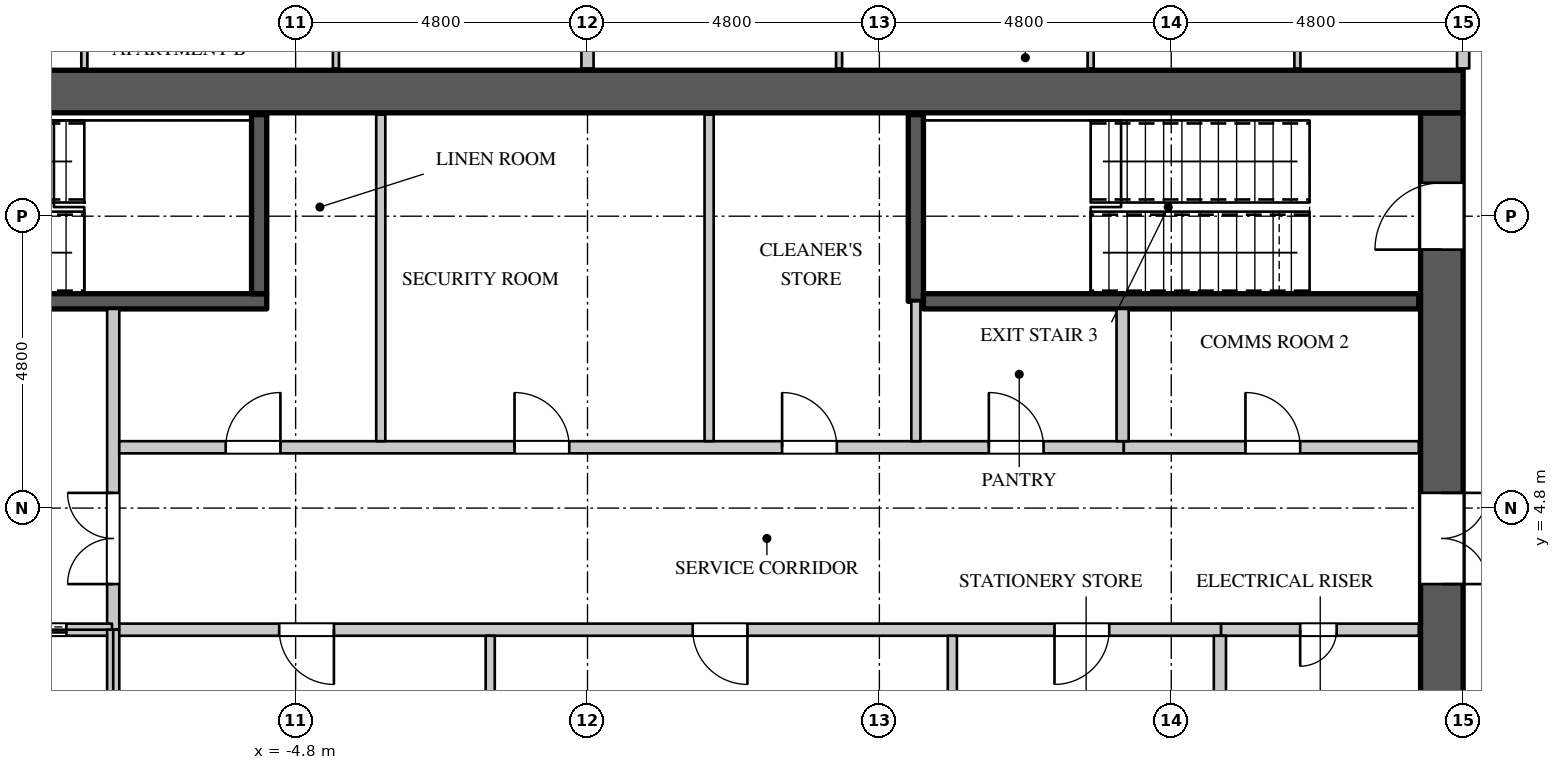
"""IFC4 building model, lengths in metres.
Left out: names, types, materials, properties, quantities, classifications, styles, units other than length and angle.
Written with IfcOpenShell. Run it as: python <this file> out.ifc"""

import sys

from ifc_helpers import new_model, si_unit, direction, frame, frame_2d, origin, place, context, subcontext, project, spatial, rectangle, extrude, element, fill, save


model = new_model("IFC4")
c1 = context("Model", 3, precision=1e-05, world=origin(), true_north=direction((0.0, 1.0)))
c2 = subcontext(c1, "Body", "Model", "MODEL_VIEW")
j1 = project(units=[si_unit("LENGTHUNIT", "METRE"), si_unit("PLANEANGLEUNIT", "RADIAN")], contexts=[c1])
p1 = place(None, origin())
s1 = spatial("IfcSite", under=j1, at=p1, CompositionType="ELEMENT")
p2 = place(p1, origin())
s2 = spatial("IfcBuilding", under=s1, at=p2, CompositionType="ELEMENT")
p3 = place(p2, frame((0.0, 0.0, 166.5)))
s3 = spatial("IfcBuildingStorey", under=s2, at=p3, CompositionType="ELEMENT", Elevation=166.5)
p4 = place(p3, frame((-14.4, 11.65, 0.0), z_axis=(0.0, 0.0, 1.0), x_axis=(1.0, 0.0, 0.0)))
e1 = element("IfcWall", 1, at=p4, inside=s3, PredefinedType="SHEAR", context=c2, shape_type="SweptSolid", body=[
    extrude(rectangle(XDim=28.8, YDim=0.7, at=frame_2d((14.4, 0.0))), origin(), (0.0, 0.0, 1.0), 4.2),
])
p5 = place(p3, frame((14.05, -11.3, 0.0), z_axis=(0.0, 0.0, 1.0), x_axis=(0.0, 1.0, 0.0)))
e2 = element("IfcWall", 2, at=p5, inside=s3, PredefinedType="SHEAR", context=c2, shape_type="SweptSolid", body=[
    extrude(rectangle(XDim=22.6, YDim=0.7, at=frame_2d((11.3, 0.0))), origin(), (0.0, 0.0, 1.0), 4.2),
])
p6 = place(p5, frame((20.35, 0.0, 0.0)))
e3 = element("IfcOpeningElement", 3, at=p6, cuts=e2, PredefinedType="OPENING", context=c2, shape_type="SweptSolid", body=[
    extrude(rectangle(XDim=1.1, YDim=2.2, at=frame_2d((0.55, 1.1))), frame((0.0, 0.36, 0.0), z_axis=(0.0, -1.0, 0.0), x_axis=(1.0, 0.0, 0.0)), (0.0, 0.0, 1.0), 0.72),
])
p7 = place(p5, frame((1.15, 0.0, 0.0)))
e4 = element("IfcOpeningElement", 4, at=p7, cuts=e2, PredefinedType="OPENING", context=c2, shape_type="SweptSolid", body=[
    extrude(rectangle(XDim=1.1, YDim=2.2, at=frame_2d((0.55, 1.1))), frame((0.0, 0.36, 0.0), z_axis=(0.0, -1.0, 0.0), x_axis=(1.0, 0.0, 0.0)), (0.0, 0.0, 1.0), 0.72),
])
p8 = place(p5, frame((14.85, 0.0, 0.0)))
e5 = element("IfcOpeningElement", 5, at=p8, cuts=e2, PredefinedType="OPENING", context=c2, shape_type="SweptSolid", body=[
    extrude(rectangle(XDim=1.5, YDim=2.4, at=frame_2d((0.75, 1.2))), frame((0.0, 0.36, 0.0), z_axis=(0.0, -1.0, 0.0), x_axis=(1.0, 0.0, 0.0)), (0.0, 0.0, 1.0), 0.72),
])
p9 = place(p5, frame((6.25, 0.0, 0.0)))
e6 = element("IfcOpeningElement", 6, at=p9, cuts=e2, PredefinedType="OPENING", context=c2, shape_type="SweptSolid", body=[
    extrude(rectangle(XDim=1.5, YDim=2.4, at=frame_2d((0.75, 1.2))), frame((0.0, 0.36, 0.0), z_axis=(0.0, -1.0, 0.0), x_axis=(1.0, 0.0, 0.0)), (0.0, 0.0, 1.0), 0.72),
])
p10 = place(p3, frame((-7.82, 2.8, 0.0), z_axis=(0.0, 0.0, 1.0), x_axis=(1.0, 0.0, 0.0)))
e7 = element("IfcWall", 7, at=p10, inside=s3, PredefinedType="PARTITIONING", context=c2, shape_type="SweptSolid", body=[
    extrude(rectangle(XDim=18.24, YDim=0.2, at=frame_2d((9.12, 0.0))), origin(), (0.0, 0.0, 1.0), 3.95),
])
p11 = place(p10, frame((2.75, 0.0, 0.0)))
e8 = element("IfcOpeningElement", 8, at=p11, cuts=e7, PredefinedType="OPENING", context=c2, shape_type="SweptSolid", body=[
    extrude(rectangle(XDim=0.9, YDim=2.2, at=frame_2d((0.45, 1.1))), frame((0.0, 0.11, 0.0), z_axis=(0.0, -1.0, 0.0), x_axis=(1.0, 0.0, 0.0)), (0.0, 0.0, 1.0), 0.22),
])
p12 = place(p10, frame((9.55, 0.0, 0.0)))
e9 = element("IfcOpeningElement", 9, at=p12, cuts=e7, PredefinedType="OPENING", context=c2, shape_type="SweptSolid", body=[
    extrude(rectangle(XDim=0.9, YDim=2.2, at=frame_2d((0.45, 1.1))), frame((0.0, 0.11, 0.0), z_axis=(0.0, -1.0, 0.0), x_axis=(1.0, 0.0, 0.0)), (0.0, 0.0, 1.0), 0.22),
])
p13 = place(p10, frame((15.5, 0.0, 0.0)))
e10 = element("IfcOpeningElement", 10, at=p13, cuts=e7, PredefinedType="OPENING", context=c2, shape_type="SweptSolid", body=[
    extrude(rectangle(XDim=0.9, YDim=2.2, at=frame_2d((0.45, 1.1))), frame((0.0, 0.11, 0.0), z_axis=(0.0, -1.0, 0.0), x_axis=(1.0, 0.0, 0.0)), (0.0, 0.0, 1.0), 0.22),
])
p14 = place(p3, frame((-7.8, 2.8, 0.0), z_axis=(0.0, 0.0, 1.0), x_axis=(0.0, 1.0, 0.0)))
e11 = element("IfcWall", 11, at=p14, inside=s3, PredefinedType="PARTITIONING", context=c2, shape_type="SweptSolid", body=[
    extrude(rectangle(XDim=5.275, YDim=0.2, at=frame_2d((2.637, 0.0))), origin(), (0.0, 0.0, 1.0), 3.95),
])
p15 = place(p14, frame((0.75, 0.0, 0.0)))
e12 = element("IfcOpeningElement", 12, at=p15, cuts=e11, PredefinedType="OPENING", context=c2, shape_type="SweptSolid", body=[
    extrude(rectangle(XDim=1.5, YDim=2.4, at=frame_2d((0.75, 1.2))), frame((0.0, 0.11, 0.0), z_axis=(0.0, -1.0, 0.0), x_axis=(1.0, 0.0, 0.0)), (0.0, 0.0, 1.0), 0.22),
])
p16 = place(p3, frame((-7.7, 5.8, 0.0), z_axis=(0.0, 0.0, 1.0), x_axis=(1.0, 0.0, 0.0)))
e13 = element("IfcWall", 13, at=p16, inside=s3, PredefinedType="PARTITIONING", context=c2, shape_type="SweptSolid", body=[
    extrude(rectangle(XDim=16.52, YDim=0.2, at=frame_2d((8.26, 0.0))), origin(), (0.0, 0.0, 1.0), 3.95),
])
p17 = place(p16, frame((1.75, 0.0, 0.0)))
e14 = element("IfcOpeningElement", 14, at=p17, cuts=e13, PredefinedType="OPENING", context=c2, shape_type="SweptSolid", body=[
    extrude(rectangle(XDim=0.9, YDim=2.2, at=frame_2d((0.45, 1.1))), frame((0.0, 0.11, 0.0), z_axis=(0.0, -1.0, 0.0), x_axis=(1.0, 0.0, 0.0)), (0.0, 0.0, 1.0), 0.22),
])
p18 = place(p16, frame((6.5, 0.0, 0.0)))
e15 = element("IfcOpeningElement", 15, at=p18, cuts=e13, PredefinedType="OPENING", context=c2, shape_type="SweptSolid", body=[
    extrude(rectangle(XDim=0.9, YDim=2.2, at=frame_2d((0.45, 1.1))), frame((0.0, 0.11, 0.0), z_axis=(0.0, -1.0, 0.0), x_axis=(1.0, 0.0, 0.0)), (0.0, 0.0, 1.0), 0.22),
])
p19 = place(p16, frame((10.9, 0.0, 0.0)))
e16 = element("IfcOpeningElement", 16, at=p19, cuts=e13, PredefinedType="OPENING", context=c2, shape_type="SweptSolid", body=[
    extrude(rectangle(XDim=0.9, YDim=2.2, at=frame_2d((0.45, 1.1))), frame((0.0, 0.11, 0.0), z_axis=(0.0, -1.0, 0.0), x_axis=(1.0, 0.0, 0.0)), (0.0, 0.0, 1.0), 0.22),
])
p20 = place(p16, frame((14.3, 0.0, 0.0)))
e17 = element("IfcOpeningElement", 17, at=p20, cuts=e13, PredefinedType="OPENING", context=c2, shape_type="SweptSolid", body=[
    extrude(rectangle(XDim=0.9, YDim=2.2, at=frame_2d((0.45, 1.1))), frame((0.0, 0.11, 0.0), z_axis=(0.0, -1.0, 0.0), x_axis=(1.0, 0.0, 0.0)), (0.0, 0.0, 1.0), 0.22),
])
p21 = place(p3, frame((14.4, 12.03, 0.0), z_axis=(0.0, 0.0, 1.0), x_axis=(0.0, 1.0, 0.0)))
e18 = element("IfcWall", 18, at=p21, inside=s3, PredefinedType="PARTITIONING", context=c2, shape_type="SweptSolid", body=[
    extrude(rectangle(XDim=2.27, YDim=0.2, at=frame_2d((1.135, 0.0))), origin(), (0.0, 0.0, 1.0), 3.95),
])
p22 = place(p3, frame((-3.4, 5.9, 0.0), z_axis=(0.0, 0.0, 1.0), x_axis=(0.0, 1.0, 0.0)))
e19 = element("IfcWall", 19, at=p22, inside=s3, PredefinedType="PARTITIONING", context=c2, shape_type="SweptSolid", body=[
    extrude(rectangle(XDim=5.37, YDim=0.15, at=frame_2d((2.685, 0.0))), origin(), (0.0, 0.0, 1.0), 3.95),
])
p23 = place(p3, frame((-1.6, 0.1, 0.0), z_axis=(0.0, 0.0, 1.0), x_axis=(0.0, 1.0, 0.0)))
e20 = element("IfcWall", 20, at=p23, inside=s3, PredefinedType="PARTITIONING", context=c2, shape_type="SweptSolid", body=[
    extrude(rectangle(XDim=2.6, YDim=0.15, at=frame_2d((1.3, 0.0))), origin(), (0.0, 0.0, 1.0), 3.95),
])
p24 = place(p3, frame((2.0, 5.9, 0.0), z_axis=(0.0, 0.0, 1.0), x_axis=(0.0, 1.0, 0.0)))
e21 = element("IfcWall", 21, at=p24, inside=s3, PredefinedType="PARTITIONING", context=c2, shape_type="SweptSolid", body=[
    extrude(rectangle(XDim=5.37, YDim=0.15, at=frame_2d((2.685, 0.0))), origin(), (0.0, 0.0, 1.0), 3.95),
])
p25 = place(p3, frame((5.4, 5.9, 0.0), z_axis=(0.0, 0.0, 1.0), x_axis=(0.0, 1.0, 0.0)))
e22 = element("IfcWall", 22, at=p25, inside=s3, PredefinedType="PARTITIONING", context=c2, shape_type="SweptSolid", body=[
    extrude(rectangle(XDim=2.3, YDim=0.15, at=frame_2d((1.15, 0.0))), origin(), (0.0, 0.0, 1.0), 3.95),
])
p26 = place(p3, frame((6.0, 0.1, 0.0), z_axis=(0.0, 0.0, 1.0), x_axis=(0.0, 1.0, 0.0)))
e23 = element("IfcWall", 23, at=p26, inside=s3, PredefinedType="PARTITIONING", context=c2, shape_type="SweptSolid", body=[
    extrude(rectangle(XDim=2.6, YDim=0.15, at=frame_2d((1.3, 0.0))), origin(), (0.0, 0.0, 1.0), 3.95),
])
p27 = place(p3, frame((0.0, 12.03, 0.0), z_axis=(0.0, 0.0, 1.0), x_axis=(0.0, 1.0, 0.0)))
e24 = element("IfcWall", 24, at=p27, inside=s3, PredefinedType="PARTITIONING", context=c2, shape_type="SweptSolid", body=[
    extrude(rectangle(XDim=12.025, YDim=0.2, at=frame_2d((6.012, 0.0))), origin(), (0.0, 0.0, 1.0), 3.95),
])
p28 = place(p3, frame((8.82, 5.8, 0.0), z_axis=(0.0, 0.0, 1.0), x_axis=(1.0, 0.0, 0.0)))
e25 = element("IfcWall", 25, at=p28, inside=s3, PredefinedType="PARTITIONING", context=c2, shape_type="SweptSolid", body=[
    extrude(rectangle(XDim=4.85, YDim=0.2, at=frame_2d((2.425, 0.0))), origin(), (0.0, 0.0, 1.0), 3.95),
])
p29 = place(p28, frame((2.0, 0.0, 0.0)))
e26 = element("IfcOpeningElement", 26, at=p29, cuts=e25, PredefinedType="OPENING", context=c2, shape_type="SweptSolid", body=[
    extrude(rectangle(XDim=0.9, YDim=2.2, at=frame_2d((0.45, 1.1))), frame((0.0, 0.11, 0.0), z_axis=(0.0, -1.0, 0.0), x_axis=(1.0, 0.0, 0.0)), (0.0, 0.0, 1.0), 0.22),
])
p30 = place(p3, frame((8.8, 5.9, 0.0), z_axis=(0.0, 0.0, 1.0), x_axis=(0.0, 1.0, 0.0)))
e27 = element("IfcWall", 27, at=p30, inside=s3, PredefinedType="PARTITIONING", context=c2, shape_type="SweptSolid", body=[
    extrude(rectangle(XDim=2.175, YDim=0.2, at=frame_2d((1.087, 0.0))), origin(), (0.0, 0.0, 1.0), 3.95),
])
p31 = place(p3, frame((10.42, 2.8, 0.0), z_axis=(0.0, 0.0, 1.0), x_axis=(1.0, 0.0, 0.0)))
e28 = element("IfcWall", 28, at=p31, inside=s3, PredefinedType="PARTITIONING", context=c2, shape_type="SweptSolid", body=[
    extrude(rectangle(XDim=3.25, YDim=0.2, at=frame_2d((1.625, 0.0))), origin(), (0.0, 0.0, 1.0), 3.95),
])
p32 = place(p31, frame((1.3, 0.0, 0.0)))
e29 = element("IfcOpeningElement", 29, at=p32, cuts=e28, PredefinedType="OPENING", context=c2, shape_type="SweptSolid", body=[
    extrude(rectangle(XDim=0.6, YDim=2.0, at=frame_2d((0.3, 1.0))), frame((0.0, 0.11, 0.0), z_axis=(0.0, -1.0, 0.0), x_axis=(1.0, 0.0, 0.0)), (0.0, 0.0, 1.0), 0.22),
])
p33 = place(p3, frame((10.4, 0.1, 0.0), z_axis=(0.0, 0.0, 1.0), x_axis=(0.0, 1.0, 0.0)))
e30 = element("IfcWall", 30, at=p33, inside=s3, PredefinedType="PARTITIONING", context=c2, shape_type="SweptSolid", body=[
    extrude(rectangle(XDim=2.6, YDim=0.2, at=frame_2d((1.3, 0.0))), origin(), (0.0, 0.0, 1.0), 3.95),
])
p34 = place(p3, frame((-13.67, 2.8, 0.0), z_axis=(0.0, 0.0, 1.0), x_axis=(1.0, 0.0, 0.0)))
e31 = element("IfcWall", 31, at=p34, inside=s3, PredefinedType="PARTITIONING", context=c2, shape_type="SweptSolid", body=[
    extrude(rectangle(XDim=5.85, YDim=0.2, at=frame_2d((2.925, 0.0))), origin(), (0.0, 0.0, 1.0), 3.95),
])
p35 = place(p34, frame((1.05, 0.0, 0.0)))
e32 = element("IfcOpeningElement", 32, at=p35, cuts=e31, PredefinedType="OPENING", context=c2, shape_type="SweptSolid", body=[
    extrude(rectangle(XDim=1.1, YDim=2.2, at=frame_2d((0.55, 1.1))), frame((0.0, 0.11, 0.0), z_axis=(0.0, -1.0, 0.0), x_axis=(1.0, 0.0, 0.0)), (0.0, 0.0, 1.0), 0.22),
])
p36 = place(p34, frame((4.0, 0.0, 0.0)))
e33 = element("IfcOpeningElement", 33, at=p36, cuts=e31, PredefinedType="OPENING", context=c2, shape_type="SweptSolid", body=[
    extrude(rectangle(XDim=1.1, YDim=2.2, at=frame_2d((0.55, 1.1))), frame((0.0, 0.11, 0.0), z_axis=(0.0, -1.0, 0.0), x_axis=(1.0, 0.0, 0.0)), (0.0, 0.0, 1.0), 0.22),
])
p37 = place(p3, frame((-7.8, 0.0, 0.0), z_axis=(0.0, 0.0, 1.0), x_axis=(0.0, 1.0, 0.0)))
e34 = element("IfcWall", 34, at=p37, inside=s3, PredefinedType="PARTITIONING", context=c2, shape_type="SweptSolid", body=[
    extrude(rectangle(XDim=2.8, YDim=0.2, at=frame_2d((1.4, 0.0))), origin(), (0.0, 0.0, 1.0), 3.95),
])
p38 = place(p3, frame((-13.67, 8.2, 0.0), z_axis=(0.0, 0.0, 1.0), x_axis=(1.0, 0.0, 0.0)))
e35 = element("IfcWall", 35, at=p38, inside=s3, PredefinedType="SHEAR", context=c2, shape_type="SweptSolid", body=[
    extrude(rectangle(XDim=8.395, YDim=0.25, at=frame_2d((4.198, 0.0))), origin(), (0.0, 0.0, 1.0), 3.95),
])
p39 = place(p38, frame((0.15, 0.0, 0.0)))
e36 = element("IfcOpeningElement", 36, at=p39, cuts=e35, PredefinedType="OPENING", context=c2, shape_type="SweptSolid", body=[
    extrude(rectangle(XDim=1.1, YDim=2.2, at=frame_2d((0.55, 1.1))), frame((0.0, 0.135, 0.0), z_axis=(0.0, -1.0, 0.0), x_axis=(1.0, 0.0, 0.0)), (0.0, 0.0, 1.0), 0.27),
])
p40 = place(p3, frame((-5.4, 8.325, 0.0), z_axis=(0.0, 0.0, 1.0), x_axis=(0.0, 1.0, 0.0)))
e37 = element("IfcWall", 37, at=p40, inside=s3, PredefinedType="SHEAR", context=c2, shape_type="SweptSolid", body=[
    extrude(rectangle(XDim=2.945, YDim=0.25, at=frame_2d((1.473, 0.0))), origin(), (0.0, 0.0, 1.0), 3.95),
])
p41 = place(p3, frame((5.4, 8.2, 0.0), z_axis=(0.0, 0.0, 1.0), x_axis=(0.0, 1.0, 0.0)))
e38 = element("IfcWall", 38, at=p41, inside=s3, PredefinedType="SHEAR", context=c2, shape_type="SweptSolid", body=[
    extrude(rectangle(XDim=3.07, YDim=0.25, at=frame_2d((1.535, 0.0))), origin(), (0.0, 0.0, 1.0), 3.95),
])
p42 = place(p3, frame((5.525, 8.2, 0.0), z_axis=(0.0, 0.0, 1.0), x_axis=(1.0, 0.0, 0.0)))
e39 = element("IfcWall", 39, at=p42, inside=s3, PredefinedType="SHEAR", context=c2, shape_type="SweptSolid", body=[
    extrude(rectangle(XDim=8.145, YDim=0.25, at=frame_2d((4.073, 0.0))), origin(), (0.0, 0.0, 1.0), 3.95),
])
p43 = place(p3, frame((-8.274, 12.03, 0.0), z_axis=(0.0, 0.0, 1.0), x_axis=(0.0, 1.0, 0.0)))
e40 = element("IfcWall", 40, at=p43, inside=s3, PredefinedType="PARTITIONING", context=c2, shape_type="SweptSolid", body=[
    extrude(rectangle(XDim=2.95, YDim=0.1, at=frame_2d((1.475, 0.0))), origin(), (0.0, 0.0, 1.0), 3.95),
])
for number, where, z_axis, x_axis in (
    (41, (-4.137, 12.03, 0.0), (0.0, 0.0, 1.0), (0.0, 1.0, 0.0)),
    (42, (4.137, 12.03, 0.0), (0.0, 0.0, 1.0), (0.0, 1.0, 0.0)),
):
    element("IfcWall", number, at=place(p3, frame(where, z_axis=z_axis, x_axis=x_axis)), inside=s3, PredefinedType="PARTITIONING", context=c2, shape_type="SweptSolid", body=[
        extrude(rectangle(XDim=5.295, YDim=0.1, at=frame_2d((2.647, 0.0))), origin(), (0.0, 0.0, 1.0), 3.35),
    ])
p44 = place(p3, frame((8.274, 12.03, 0.0), z_axis=(0.0, 0.0, 1.0), x_axis=(0.0, 1.0, 0.0)))
e43 = element("IfcWall", 43, at=p44, inside=s3, PredefinedType="PARTITIONING", context=c2, shape_type="SweptSolid", body=[
    extrude(rectangle(XDim=2.95, YDim=0.1, at=frame_2d((1.475, 0.0))), origin(), (0.0, 0.0, 1.0), 3.95),
])
p45 = place(p3, frame((11.675, 12.03, 0.0), z_axis=(0.0, 0.0, 1.0), x_axis=(0.0, 1.0, 0.0)))
e44 = element("IfcWall", 44, at=p45, inside=s3, PredefinedType="PARTITIONING", context=c2, shape_type="SweptSolid", body=[
    extrude(rectangle(XDim=2.895, YDim=0.1, at=frame_2d((1.448, 0.0))), origin(), (0.0, 0.0, 1.0), 3.95),
])
p46 = place(p45, frame((0.95, 0.0, 0.0)))
e45 = element("IfcOpeningElement", 45, at=p46, cuts=e44, PredefinedType="OPENING", context=c2, shape_type="SweptSolid", body=[
    extrude(rectangle(XDim=0.9, YDim=2.2, at=frame_2d((0.45, 1.1))), frame((0.0, 0.06, 0.0), z_axis=(0.0, -1.0, 0.0), x_axis=(1.0, 0.0, 0.0)), (0.0, 0.0, 1.0), 0.12),
])
p47 = place(p32, origin())
e46 = element("IfcDoor", 46, at=p47, inside=s3, OperationType="SINGLE_SWING_RIGHT", PredefinedType="DOOR", context=c2, shape_type="SweptSolid", body=[
    extrude(rectangle(XDim=0.6, YDim=2.0, at=frame_2d((0.3, 1.0))), frame((0.0, 0.025, 0.0), z_axis=(0.0, -1.0, 0.0), x_axis=(1.0, 0.0, 0.0)), (0.0, 0.0, 1.0), 0.05),
])
fill(e29, e46)
p48 = place(p17, origin())
e47 = element("IfcDoor", 47, at=p48, inside=s3, OperationType="SINGLE_SWING_RIGHT", PredefinedType="DOOR", context=c2, shape_type="SweptSolid", body=[
    extrude(rectangle(XDim=0.9, YDim=2.2, at=frame_2d((0.45, 1.1))), frame((0.0, 0.025, 0.0), z_axis=(0.0, -1.0, 0.0), x_axis=(1.0, 0.0, 0.0)), (0.0, 0.0, 1.0), 0.05),
])
fill(e14, e47)
p49 = place(p18, origin())
e48 = element("IfcDoor", 48, at=p49, inside=s3, OperationType="SINGLE_SWING_LEFT", PredefinedType="DOOR", context=c2, shape_type="SweptSolid", body=[
    extrude(rectangle(XDim=0.9, YDim=2.2, at=frame_2d((0.45, 1.1))), frame((0.0, 0.025, 0.0), z_axis=(0.0, -1.0, 0.0), x_axis=(1.0, 0.0, 0.0)), (0.0, 0.0, 1.0), 0.05),
])
fill(e15, e48)
p50 = place(p19, origin())
e49 = element("IfcDoor", 49, at=p50, inside=s3, OperationType="SINGLE_SWING_LEFT", PredefinedType="DOOR", context=c2, shape_type="SweptSolid", body=[
    extrude(rectangle(XDim=0.9, YDim=2.2, at=frame_2d((0.45, 1.1))), frame((0.0, 0.025, 0.0), z_axis=(0.0, -1.0, 0.0), x_axis=(1.0, 0.0, 0.0)), (0.0, 0.0, 1.0), 0.05),
])
fill(e16, e49)
p51 = place(p20, origin())
e50 = element("IfcDoor", 50, at=p51, inside=s3, OperationType="SINGLE_SWING_LEFT", PredefinedType="DOOR", context=c2, shape_type="SweptSolid", body=[
    extrude(rectangle(XDim=0.9, YDim=2.2, at=frame_2d((0.45, 1.1))), frame((0.0, 0.025, 0.0), z_axis=(0.0, -1.0, 0.0), x_axis=(1.0, 0.0, 0.0)), (0.0, 0.0, 1.0), 0.05),
])
fill(e17, e50)
p52 = place(p29, origin())
e51 = element("IfcDoor", 51, at=p52, inside=s3, OperationType="SINGLE_SWING_LEFT", PredefinedType="DOOR", context=c2, shape_type="SweptSolid", body=[
    extrude(rectangle(XDim=0.9, YDim=2.2, at=frame_2d((0.45, 1.1))), frame((0.0, 0.025, 0.0), z_axis=(0.0, -1.0, 0.0), x_axis=(1.0, 0.0, 0.0)), (0.0, 0.0, 1.0), 0.05),
])
fill(e26, e51)
p53 = place(p11, origin())
e52 = element("IfcDoor", 52, at=p53, inside=s3, OperationType="SINGLE_SWING_LEFT", PredefinedType="DOOR", context=c2, shape_type="SweptSolid", body=[
    extrude(rectangle(XDim=0.9, YDim=2.2, at=frame_2d((0.45, 1.1))), frame((0.0, 0.025, 0.0), z_axis=(0.0, -1.0, 0.0), x_axis=(1.0, 0.0, 0.0)), (0.0, 0.0, 1.0), 0.05),
])
fill(e8, e52)
p54 = place(p12, origin())
e53 = element("IfcDoor", 53, at=p54, inside=s3, OperationType="SINGLE_SWING_LEFT", PredefinedType="DOOR", context=c2, shape_type="SweptSolid", body=[
    extrude(rectangle(XDim=0.9, YDim=2.2, at=frame_2d((0.45, 1.1))), frame((0.0, 0.025, 0.0), z_axis=(0.0, -1.0, 0.0), x_axis=(1.0, 0.0, 0.0)), (0.0, 0.0, 1.0), 0.05),
])
fill(e9, e53)
p55 = place(p13, origin())
e54 = element("IfcDoor", 54, at=p55, inside=s3, OperationType="SINGLE_SWING_RIGHT", PredefinedType="DOOR", context=c2, shape_type="SweptSolid", body=[
    extrude(rectangle(XDim=0.9, YDim=2.2, at=frame_2d((0.45, 1.1))), frame((0.0, 0.025, 0.0), z_axis=(0.0, -1.0, 0.0), x_axis=(1.0, 0.0, 0.0)), (0.0, 0.0, 1.0), 0.05),
])
fill(e10, e54)
p56 = place(p36, origin())
e55 = element("IfcDoor", 55, at=p56, inside=s3, OperationType="DOUBLE_DOOR_SLIDING", PredefinedType="DOOR", context=c2, shape_type="SweptSolid", body=[
    extrude(rectangle(XDim=1.1, YDim=2.2, at=frame_2d((0.55, 1.1))), frame((0.0, 0.025, 0.0), z_axis=(0.0, -1.0, 0.0), x_axis=(1.0, 0.0, 0.0)), (0.0, 0.0, 1.0), 0.05),
])
fill(e33, e55)
p57 = place(p15, origin())
e56 = element("IfcDoor", 56, at=p57, inside=s3, OperationType="DOUBLE_DOOR_SINGLE_SWING", PredefinedType="DOOR", context=c2, shape_type="SweptSolid", body=[
    extrude(rectangle(XDim=1.5, YDim=2.4, at=frame_2d((0.75, 1.2))), frame((0.0, 0.025, 0.0), z_axis=(0.0, -1.0, 0.0), x_axis=(1.0, 0.0, 0.0)), (0.0, 0.0, 1.0), 0.05),
])
fill(e12, e56)
p58 = place(p6, origin())
e57 = element("IfcDoor", 57, at=p58, inside=s3, OperationType="SINGLE_SWING_LEFT", PredefinedType="DOOR", context=c2, shape_type="SweptSolid", body=[
    extrude(rectangle(XDim=1.1, YDim=2.2, at=frame_2d((0.55, 1.1))), frame((0.0, 0.345, 0.0), z_axis=(0.0, -1.0, 0.0), x_axis=(1.0, 0.0, 0.0)), (0.0, 0.0, 1.0), 0.05),
])
fill(e3, e57)
p59 = place(p8, origin())
e58 = element("IfcDoor", 58, at=p59, inside=s3, OperationType="DOUBLE_DOOR_SINGLE_SWING", PredefinedType="DOOR", context=c2, shape_type="SweptSolid", body=[
    extrude(rectangle(XDim=1.5, YDim=2.4, at=frame_2d((0.75, 1.2))), frame((0.0, -0.295, 0.0), z_axis=(0.0, -1.0, 0.0), x_axis=(1.0, 0.0, 0.0)), (0.0, 0.0, 1.0), 0.05),
])
fill(e5, e58)
save(model, sys.argv[1])
